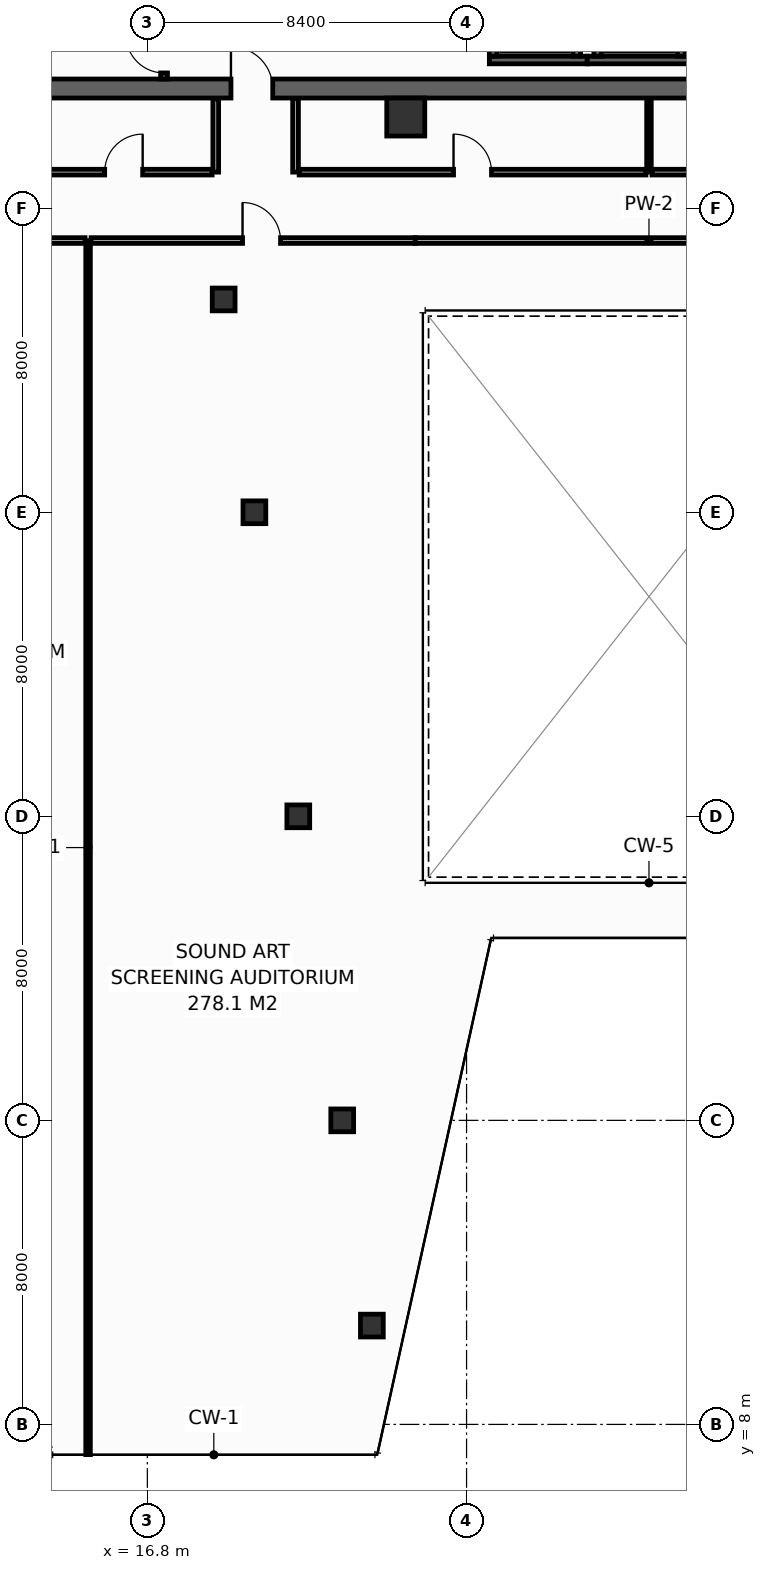
"""IFC4 building model, lengths in metres.
Left out: names, types, materials, properties, quantities, classifications, styles, units other than length and angle.
Written with IfcOpenShell. Run it as: python <this file> out.ifc"""

import sys

from ifc_helpers import new_model, si_unit, direction, frame, frame_2d, origin, origin_2d, place, context, subcontext, project, spatial, rectangle, hollow_rectangle, extrude, element, fill, save


model = new_model("IFC4")
c1 = context("Model", 3, precision=1e-05, world=origin(), true_north=direction((0.0, 1.0)))
c2 = subcontext(c1, "Body", "Model", "MODEL_VIEW")
j1 = project(units=[si_unit("LENGTHUNIT", "METRE"), si_unit("PLANEANGLEUNIT", "RADIAN")], contexts=[c1])
p1 = place(None, origin())
s1 = spatial("IfcSite", under=j1, at=p1, CompositionType="ELEMENT")
p2 = place(p1, origin())
s2 = spatial("IfcBuilding", under=s1, at=p2, CompositionType="ELEMENT")
p3 = place(p2, frame((0.0, 0.0, 144.8)))
s3 = spatial("IfcBuildingStorey", under=s2, at=p3, CompositionType="ELEMENT", Elevation=144.8)
p4 = place(p3, frame((13.6, 43.15, 0.0), z_axis=(0.0, 0.0, 1.0), x_axis=(1.0, 0.0, 0.0)))
e1 = element("IfcWall", 1, at=p4, inside=s3, PredefinedType="SHEAR", context=c2, shape_type="SweptSolid", body=[
    extrude(rectangle(XDim=32.7, YDim=0.5, at=frame_2d((16.35, 0.0))), origin(), (0.0, 0.0, 1.0), 3.55),
])
p5 = place(p4, frame((5.4, 0.0, 0.0)))
e2 = element("IfcOpeningElement", 2, at=p5, cuts=e1, PredefinedType="OPENING", context=c2, shape_type="SweptSolid", body=[
    extrude(rectangle(XDim=1.1, YDim=2.15, at=frame_2d((0.55, 1.075))), frame((0.0, 0.26, 0.0), z_axis=(0.0, -1.0, 0.0), x_axis=(1.0, 0.0, 0.0)), (0.0, 0.0, 1.0), 0.52),
])
p6 = place(p4, frame((25.6, 0.0, 0.0)))
e3 = element("IfcOpeningElement", 3, at=p6, cuts=e1, PredefinedType="OPENING", context=c2, shape_type="SweptSolid", body=[
    extrude(rectangle(XDim=1.1, YDim=2.15, at=frame_2d((0.55, 1.075))), frame((0.0, 0.26, 0.0), z_axis=(0.0, -1.0, 0.0), x_axis=(1.0, 0.0, 0.0)), (0.0, 0.0, 1.0), 0.52),
])
p7 = place(p3, frame((23.6, 42.4, 0.0), z_axis=(0.0, 0.0, 1.0), x_axis=(1.0, 0.0, 0.0)))
e4 = element("IfcColumn", 4, at=p7, inside=s3, PredefinedType="COLUMN", context=c2, shape_type="SweptSolid", body=[
    extrude(hollow_rectangle(XDim=1.0, YDim=1.0, WallThickness=0.045, at=origin_2d()), origin(), (0.0, 0.0, 1.0), 3.8),
])
for number, where, z_axis, x_axis in (
    (5, (22.708, 10.6, 0.0), (0.0, 0.0, 1.0), (1.0, 0.0, 0.0)),
    (6, (21.928, 16.0, 0.0), (0.0, 0.0, 1.0), (1.0, 0.0, 0.0)),
    (7, (20.772, 24.0, 0.0), (0.0, 0.0, 1.0), (1.0, 0.0, 0.0)),
    (8, (19.617, 32.0, 0.0), (0.0, 0.0, 1.0), (1.0, 0.0, 0.0)),
    (9, (18.808, 37.6, 0.0), (0.0, 0.0, 1.0), (1.0, 0.0, 0.0)),
):
    element("IfcColumn", number, at=place(p3, frame(where, z_axis=z_axis, x_axis=x_axis)), inside=s3, PredefinedType="COLUMN", context=c2, shape_type="SweptSolid", body=[
        extrude(hollow_rectangle(XDim=0.6, YDim=0.6, WallThickness=0.028, at=origin_2d()), origin(), (0.0, 0.0, 1.0), 3.8),
    ])
p8 = place(p3, frame((25.8, 43.9, 0.0), z_axis=(0.0, 0.0, 1.0), x_axis=(1.0, 0.0, 0.0)))
e10 = element("IfcWall", 10, at=p8, inside=s3, PredefinedType="SHEAR", context=c2, shape_type="SweptSolid", body=[
    extrude(rectangle(XDim=2.575, YDim=0.2, at=frame_2d((1.288, 0.0))), origin(), (0.0, 0.0, 1.0), 3.55),
])
for number, where, z_axis, x_axis in (
    (11, (25.9, 44.0, 0.0), (0.0, 0.0, 1.0), (0.0, 1.0, 0.0)),
    (12, (28.1, 44.0, 0.0), (0.0, 0.0, 1.0), (0.0, 1.0, 0.0)),
):
    element("IfcWall", number, at=place(p3, frame(where, z_axis=z_axis, x_axis=x_axis)), inside=s3, PredefinedType="SHEAR", context=c2, shape_type="SweptSolid", body=[
        extrude(rectangle(XDim=2.3, YDim=0.2, at=frame_2d((1.15, 0.0))), origin(), (0.0, 0.0, 1.0), 3.55),
    ])
p9 = place(p3, frame((28.375, 43.9, 0.0), z_axis=(0.0, 0.0, 1.0), x_axis=(1.0, 0.0, 0.0)))
e13 = element("IfcWall", 13, at=p9, inside=s3, PredefinedType="SHEAR", context=c2, shape_type="SweptSolid", body=[
    extrude(rectangle(XDim=2.75, YDim=0.2, at=frame_2d((1.375, 0.0))), origin(), (0.0, 0.0, 1.0), 3.55),
])
for number, where, z_axis, x_axis in (
    (14, (28.65, 44.0, 0.0), (0.0, 0.0, 1.0), (0.0, 1.0, 0.0)),
    (15, (30.85, 44.0, 0.0), (0.0, 0.0, 1.0), (0.0, 1.0, 0.0)),
):
    element("IfcWall", number, at=place(p3, frame(where, z_axis=z_axis, x_axis=x_axis)), inside=s3, PredefinedType="SHEAR", context=c2, shape_type="SweptSolid", body=[
        extrude(rectangle(XDim=2.3, YDim=0.2, at=frame_2d((1.15, 0.0))), origin(), (0.0, 0.0, 1.0), 3.55),
    ])
p10 = place(p3, frame((17.24, 43.4, 0.0), z_axis=(0.0, 0.0, 1.0), x_axis=(0.0, 1.0, 0.0)))
e16 = element("IfcWall", 16, at=p10, inside=s3, PredefinedType="SHEAR", context=c2, shape_type="SweptSolid", body=[
    extrude(rectangle(XDim=10.4, YDim=0.18, at=frame_2d((5.2, 0.0))), origin(), (0.0, 0.0, 1.0), 3.55),
])
p11 = place(p10, frame((0.16, 0.0, 0.0)))
e17 = element("IfcOpeningElement", 17, at=p11, cuts=e16, PredefinedType="OPENING", context=c2, shape_type="SweptSolid", body=[
    extrude(rectangle(XDim=1.0, YDim=2.15, at=frame_2d((0.5, 1.075))), frame((0.0, 0.1, 0.0), z_axis=(0.0, -1.0, 0.0), x_axis=(1.0, 0.0, 0.0)), (0.0, 0.0, 1.0), 0.2),
])
for number, where, z_axis, x_axis in (
    (18, (18.6, 40.95, 0.0), (0.0, 0.0, 1.0), (0.0, 1.0, 0.0)),
    (19, (20.7, 40.95, 0.0), (0.0, 0.0, 1.0), (0.0, 1.0, 0.0)),
):
    element("IfcWall", number, at=place(p3, frame(where, z_axis=z_axis, x_axis=x_axis)), inside=s3, PredefinedType="PARTITIONING", context=c2, shape_type="SweptSolid", body=[
        extrude(rectangle(XDim=1.93, YDim=0.15, at=frame_2d((0.965, 0.0))), origin(), (0.0, 0.0, 1.0), 3.55),
    ])
p12 = place(p3, frame((13.85, 40.95, 0.0), z_axis=(0.0, 0.0, 1.0), x_axis=(1.0, 0.0, 0.0)))
e20 = element("IfcWall", 20, at=p12, inside=s3, PredefinedType="PARTITIONING", context=c2, shape_type="SweptSolid", body=[
    extrude(rectangle(XDim=4.655, YDim=0.15, at=frame_2d((2.327, 0.0))), origin(), (0.0, 0.0, 1.0), 3.55),
])
p13 = place(p12, frame((1.827, 0.0, 0.0)))
e21 = element("IfcOpeningElement", 21, at=p13, cuts=e20, PredefinedType="OPENING", context=c2, shape_type="SweptSolid", body=[
    extrude(rectangle(XDim=1.0, YDim=2.15, at=frame_2d((0.5, 1.075))), frame((0.0, 0.085, 0.0), z_axis=(0.0, -1.0, 0.0), x_axis=(1.0, 0.0, 0.0)), (0.0, 0.0, 1.0), 0.17),
])
p14 = place(p3, frame((30.0, 40.95, 0.0), z_axis=(0.0, 0.0, 1.0), x_axis=(0.0, 1.0, 0.0)))
e22 = element("IfcWall", 22, at=p14, inside=s3, PredefinedType="PARTITIONING", context=c2, shape_type="SweptSolid", body=[
    extrude(rectangle(XDim=1.93, YDim=0.12, at=frame_2d((0.965, 0.0))), origin(), (0.0, 0.0, 1.0), 2.835),
])
p15 = place(p3, frame((20.795, 40.95, 0.0), z_axis=(0.0, 0.0, 1.0), x_axis=(1.0, 0.0, 0.0)))
e23 = element("IfcWall", 23, at=p15, inside=s3, PredefinedType="PARTITIONING", context=c2, shape_type="SweptSolid", body=[
    extrude(rectangle(XDim=9.125, YDim=0.15, at=frame_2d((4.562, 0.0))), origin(), (0.0, 0.0, 1.0), 2.835),
])
p16 = place(p15, frame((4.062, 0.0, 0.0)))
e24 = element("IfcOpeningElement", 24, at=p16, cuts=e23, PredefinedType="OPENING", context=c2, shape_type="SweptSolid", body=[
    extrude(rectangle(XDim=1.0, YDim=2.15, at=frame_2d((0.5, 1.075))), frame((0.0, 0.085, 0.0), z_axis=(0.0, -1.0, 0.0), x_axis=(1.0, 0.0, 0.0)), (0.0, 0.0, 1.0), 0.17),
])
p17 = place(p3, frame((30.08, 40.95, 0.0), z_axis=(0.0, 0.0, 1.0), x_axis=(1.0, 0.0, 0.0)))
e25 = element("IfcWall", 25, at=p17, inside=s3, PredefinedType="PARTITIONING", context=c2, shape_type="SweptSolid", body=[
    extrude(rectangle(XDim=8.625, YDim=0.15, at=frame_2d((4.312, 0.0))), origin(), (0.0, 0.0, 1.0), 2.835),
])
p18 = place(p17, frame((3.788, 0.0, 0.0)))
e26 = element("IfcOpeningElement", 26, at=p18, cuts=e25, PredefinedType="OPENING", context=c2, shape_type="SweptSolid", body=[
    extrude(rectangle(XDim=1.05, YDim=2.15, at=frame_2d((0.525, 1.075))), frame((0.0, 0.085, 0.0), z_axis=(0.0, -1.0, 0.0), x_axis=(1.0, 0.0, 0.0)), (0.0, 0.0, 1.0), 0.17),
])
p19 = place(p3, frame((15.24, 7.205, 0.0), z_axis=(0.0, 0.0, 1.0), x_axis=(0.0, 1.0, 0.0)))
e27 = element("IfcWall", 27, at=p19, inside=s3, PredefinedType="PARTITIONING", context=c2, shape_type="SweptSolid", body=[
    extrude(rectangle(XDim=31.945, YDim=0.12, at=frame_2d((15.972, 0.0))), origin(), (0.0, 0.0, 1.0), 2.835),
])
p20 = place(p3, frame((6.334, 39.15, 0.0), z_axis=(0.0, 0.0, 1.0), x_axis=(1.0, 0.0, 0.0)))
e28 = element("IfcWall", 28, at=p20, inside=s3, PredefinedType="PARTITIONING", context=c2, shape_type="SweptSolid", body=[
    extrude(rectangle(XDim=8.826, YDim=0.15, at=frame_2d((4.413, 0.0))), origin(), (0.0, 0.0, 1.0), 3.035),
])
p21 = place(p20, frame((3.913, 0.0, 0.0)))
e29 = element("IfcOpeningElement", 29, at=p21, cuts=e28, PredefinedType="OPENING", context=c2, shape_type="SweptSolid", body=[
    extrude(rectangle(XDim=1.0, YDim=2.15, at=frame_2d((0.5, 1.075))), frame((0.0, 0.085, 0.0), z_axis=(0.0, -1.0, 0.0), x_axis=(1.0, 0.0, 0.0)), (0.0, 0.0, 1.0), 0.17),
])
p22 = place(p3, frame((15.32, 39.15, 0.0), z_axis=(0.0, 0.0, 1.0), x_axis=(1.0, 0.0, 0.0)))
e30 = element("IfcWall", 30, at=p22, inside=s3, PredefinedType="PARTITIONING", context=c2, shape_type="SweptSolid", body=[
    extrude(rectangle(XDim=8.53, YDim=0.15, at=frame_2d((4.265, 0.0))), origin(), (0.0, 0.0, 1.0), 2.835),
])
p23 = place(p22, frame((3.985, 0.0, 0.0)))
e31 = element("IfcOpeningElement", 31, at=p23, cuts=e30, PredefinedType="OPENING", context=c2, shape_type="SweptSolid", body=[
    extrude(rectangle(XDim=1.0, YDim=2.15, at=frame_2d((0.5, 1.075))), frame((0.0, 0.085, 0.0), z_axis=(0.0, -1.0, 0.0), x_axis=(1.0, 0.0, 0.0)), (0.0, 0.0, 1.0), 0.17),
])
p24 = place(p3, frame((23.85, 39.15, 0.0), z_axis=(0.0, 0.0, 1.0), x_axis=(1.0, 0.0, 0.0)))
e32 = element("IfcWall", 32, at=p24, inside=s3, PredefinedType="PARTITIONING", context=c2, shape_type="SweptSolid", body=[
    extrude(rectangle(XDim=12.3, YDim=0.15, at=frame_2d((6.15, 0.0))), origin(), (0.0, 0.0, 1.0), 3.55),
])
p25 = place(p11, origin())
e33 = element("IfcDoor", 33, at=p25, inside=s3, OperationType="SINGLE_SWING_RIGHT", PredefinedType="DOOR", context=c2, shape_type="SweptSolid", body=[
    extrude(rectangle(XDim=1.0, YDim=2.15, at=frame_2d((0.5, 1.075))), frame((0.0, 0.025, 0.0), z_axis=(0.0, -1.0, 0.0), x_axis=(1.0, 0.0, 0.0)), (0.0, 0.0, 1.0), 0.05),
])
fill(e17, e33)
p26 = place(p5, origin())
e34 = element("IfcDoor", 34, at=p26, inside=s3, OperationType="SINGLE_SWING_LEFT", PredefinedType="DOOR", context=c2, shape_type="SweptSolid", body=[
    extrude(rectangle(XDim=1.1, YDim=2.15, at=frame_2d((0.55, 1.075))), frame((0.0, 0.025, 0.0), z_axis=(0.0, -1.0, 0.0), x_axis=(1.0, 0.0, 0.0)), (0.0, 0.0, 1.0), 0.05),
])
fill(e2, e34)
p27 = place(p13, origin())
e35 = element("IfcDoor", 35, at=p27, inside=s3, OperationType="SINGLE_SWING_RIGHT", PredefinedType="DOOR", context=c2, shape_type="SweptSolid", body=[
    extrude(rectangle(XDim=1.0, YDim=2.15, at=frame_2d((0.5, 1.075))), frame((0.0, 0.025, 0.0), z_axis=(0.0, -1.0, 0.0), x_axis=(1.0, 0.0, 0.0)), (0.0, 0.0, 1.0), 0.05),
])
fill(e21, e35)
p28 = place(p16, origin())
e36 = element("IfcDoor", 36, at=p28, inside=s3, OperationType="SINGLE_SWING_LEFT", PredefinedType="DOOR", context=c2, shape_type="SweptSolid", body=[
    extrude(rectangle(XDim=1.0, YDim=2.15, at=frame_2d((0.5, 1.075))), frame((0.0, 0.025, 0.0), z_axis=(0.0, -1.0, 0.0), x_axis=(1.0, 0.0, 0.0)), (0.0, 0.0, 1.0), 0.05),
])
fill(e24, e36)
p29 = place(p23, origin())
e37 = element("IfcDoor", 37, at=p29, inside=s3, OperationType="SINGLE_SWING_LEFT", PredefinedType="DOOR", context=c2, shape_type="SweptSolid", body=[
    extrude(rectangle(XDim=1.0, YDim=2.15, at=frame_2d((0.5, 1.075))), frame((0.0, 0.025, 0.0), z_axis=(0.0, -1.0, 0.0), x_axis=(1.0, 0.0, 0.0)), (0.0, 0.0, 1.0), 0.05),
])
fill(e31, e37)
save(model, sys.argv[1])
